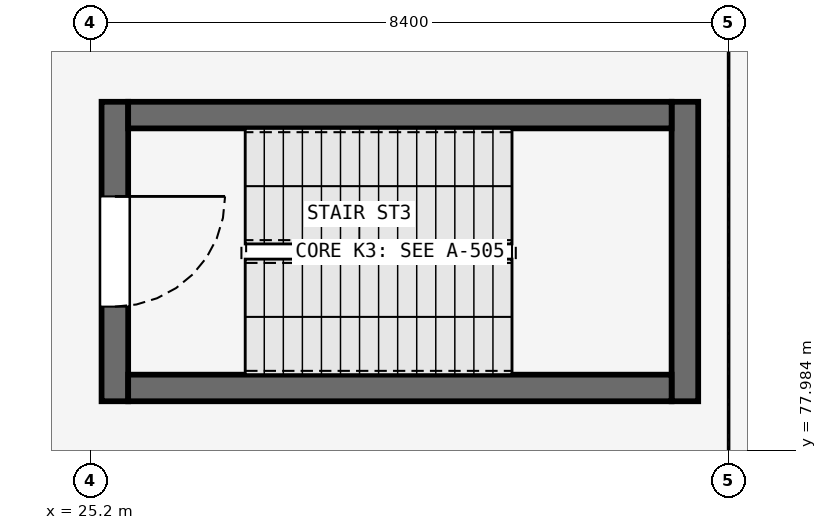
"""IFC4 building model, lengths in metres.
Left out: names, types, materials, properties, quantities, classifications, styles, units other than length and angle.
Written with IfcOpenShell. Run it as: python <this file> out.ifc"""

import sys

from ifc_helpers import new_model, si_unit, direction, frame, frame_2d, origin, place, context, subcontext, project, spatial, rectangle, extrude, element, fill, save


model = new_model("IFC4")
c1 = context("Model", 3, precision=1e-05, world=origin(), true_north=direction((0.0, 1.0)))
c2 = subcontext(c1, "Body", "Model", "MODEL_VIEW")
j1 = project(units=[si_unit("LENGTHUNIT", "METRE"), si_unit("PLANEANGLEUNIT", "RADIAN")], contexts=[c1])
p1 = place(None, origin())
s1 = spatial("IfcSite", under=j1, at=p1, CompositionType="ELEMENT")
p2 = place(p1, origin())
s2 = spatial("IfcBuilding", under=s1, at=p2, CompositionType="ELEMENT")
p3 = place(p2, frame((0.0, 0.0, 14.4)))
s3 = spatial("IfcBuildingStorey", under=s2, at=p3, CompositionType="ELEMENT", Elevation=14.4)
p4 = place(p3, frame((25.525, 82.57, 0.0), z_axis=(0.0, 0.0, 1.0), x_axis=(0.0, -1.0, 0.0)))
e1 = element("IfcWall", 1, at=p4, inside=s3, PredefinedType="SHEAR", context=c2, shape_type="SweptSolid", body=[
    extrude(rectangle(XDim=3.94, YDim=0.35, at=frame_2d((1.97, 0.0))), origin(), (0.0, 0.0, 1.0), 4.2),
])
p5 = place(p4, frame((1.245, 0.0, 0.0)))
e2 = element("IfcOpeningElement", 2, at=p5, cuts=e1, PredefinedType="OPENING", context=c2, shape_type="SweptSolid", body=[
    extrude(rectangle(XDim=1.45, YDim=2.2, at=frame_2d((0.725, 1.1))), frame((0.0, 0.185, 0.0), z_axis=(0.0, -1.0, 0.0), x_axis=(1.0, 0.0, 0.0)), (0.0, 0.0, 1.0), 0.37),
])
p6 = place(p3, frame((33.025, 78.63, 0.0), z_axis=(0.0, 0.0, 1.0), x_axis=(0.0, 1.0, 0.0)))
e3 = element("IfcWall", 3, at=p6, inside=s3, PredefinedType="SHEAR", context=c2, shape_type="SweptSolid", body=[
    extrude(rectangle(XDim=3.94, YDim=0.35, at=frame_2d((1.97, 0.0))), origin(), (0.0, 0.0, 1.0), 4.2),
])
for number, where, z_axis, x_axis in (
    (4, (25.7, 78.805, 0.0), (0.0, 0.0, 1.0), (1.0, 0.0, 0.0)),
    (5, (25.7, 82.395, 0.0), (0.0, 0.0, 1.0), (1.0, 0.0, 0.0)),
):
    element("IfcWall", number, at=place(p3, frame(where, z_axis=z_axis, x_axis=x_axis)), inside=s3, PredefinedType="SHEAR", context=c2, shape_type="SweptSolid", body=[
        extrude(rectangle(XDim=7.15, YDim=0.35, at=frame_2d((3.575, 0.0))), origin(), (0.0, 0.0, 1.0), 4.2),
    ])
p7 = place(p5, origin())
e6 = element("IfcDoor", 6, at=p7, inside=s3, OperationType="SINGLE_SWING_LEFT", PredefinedType="DOOR", context=c2, shape_type="SweptSolid", body=[
    extrude(rectangle(XDim=1.45, YDim=2.2, at=frame_2d((0.725, 1.1))), frame((0.0, 0.025, 0.0), z_axis=(0.0, -1.0, 0.0), x_axis=(1.0, 0.0, 0.0)), (0.0, 0.0, 1.0), 0.05),
])
fill(e2, e6)
save(model, sys.argv[1])
